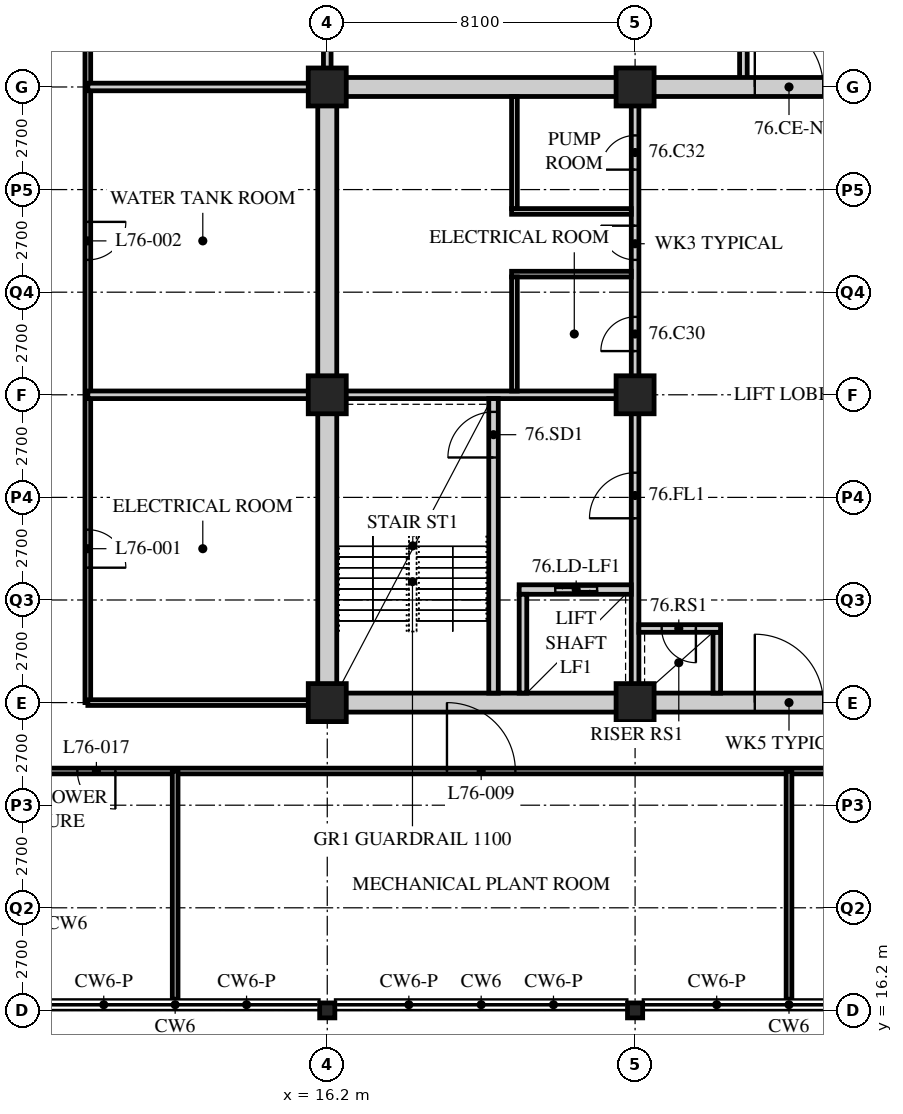
"""IFC4 building model, lengths in metres.
Left out: names, types, materials, properties, quantities, classifications, styles, units other than length and angle.
Written with IfcOpenShell. Run it as: python <this file> out.ifc"""

import sys

from ifc_helpers import new_model, si_unit, direction, frame, frame_2d, origin, origin_2d, place, context, subcontext, project, spatial, rectangle, hollow_rectangle, i_section, extrude, element, fill, save


model = new_model("IFC4")
c1 = context("Model", 3, precision=1e-05, world=origin(), true_north=direction((0.0, 1.0)))
c2 = subcontext(c1, "Body", "Model", "MODEL_VIEW")
j1 = project(units=[si_unit("LENGTHUNIT", "METRE"), si_unit("PLANEANGLEUNIT", "RADIAN")], contexts=[c1])
p1 = place(None, origin())
s1 = spatial("IfcSite", under=j1, at=p1, CompositionType="ELEMENT")
p2 = place(p1, origin())
s2 = spatial("IfcBuilding", under=s1, at=p2, CompositionType="ELEMENT")
p3 = place(p2, frame((0.0, 0.0, 298.5)))
s3 = spatial("IfcBuildingStorey", under=s2, at=p3, CompositionType="ELEMENT", Elevation=298.5)
p4 = place(p3, frame((16.2, 16.2, 0.0), z_axis=(0.0, 0.0, 1.0), x_axis=(1.0, 0.0, 0.0)))
e1 = element("IfcColumn", 1, at=p4, inside=s3, PredefinedType="COLUMN", context=c2, shape_type="SweptSolid", body=[
    extrude(i_section(OverallWidth=0.399, OverallDepth=0.394, WebThickness=0.023, FlangeThickness=0.037, FilletRadius=0.015, at=origin_2d()), origin(), (0.0, 0.0, 1.0), 5.4),
])
for number, where, z_axis, x_axis in (
    (2, (16.2, 24.3, 0.0), (0.0, 0.0, 1.0), (1.0, 0.0, 0.0)),
    (3, (16.2, 32.4, 0.0), (0.0, 0.0, 1.0), (1.0, 0.0, 0.0)),
    (4, (16.2, 40.5, 0.0), (0.0, 0.0, 1.0), (1.0, 0.0, 0.0)),
):
    element("IfcColumn", number, at=place(p3, frame(where, z_axis=z_axis, x_axis=x_axis)), inside=s3, PredefinedType="COLUMN", context=c2, shape_type="SweptSolid", body=[
        extrude(hollow_rectangle(XDim=1.0, YDim=1.0, WallThickness=0.1, at=origin_2d()), origin(), (0.0, 0.0, 1.0), 5.4),
    ])
p5 = place(p3, frame((24.3, 16.2, 0.0), z_axis=(0.0, 0.0, 1.0), x_axis=(1.0, 0.0, 0.0)))
e5 = element("IfcColumn", 5, at=p5, inside=s3, PredefinedType="COLUMN", context=c2, shape_type="SweptSolid", body=[
    extrude(i_section(OverallWidth=0.399, OverallDepth=0.394, WebThickness=0.023, FlangeThickness=0.037, FilletRadius=0.015, at=origin_2d()), origin(), (0.0, 0.0, 1.0), 5.4),
])
for number, where, z_axis, x_axis in (
    (6, (24.3, 24.3, 0.0), (0.0, 0.0, 1.0), (1.0, 0.0, 0.0)),
    (7, (24.3, 32.4, 0.0), (0.0, 0.0, 1.0), (1.0, 0.0, 0.0)),
    (8, (24.3, 40.5, 0.0), (0.0, 0.0, 1.0), (1.0, 0.0, 0.0)),
):
    element("IfcColumn", number, at=place(p3, frame(where, z_axis=z_axis, x_axis=x_axis)), inside=s3, PredefinedType="COLUMN", context=c2, shape_type="SweptSolid", body=[
        extrude(hollow_rectangle(XDim=1.0, YDim=1.0, WallThickness=0.1, at=origin_2d()), origin(), (0.0, 0.0, 1.0), 5.4),
    ])
p6 = place(p3, frame((8.1, 22.5, 0.0), z_axis=(0.0, 0.0, 1.0), x_axis=(1.0, 0.0, 0.0)))
e9 = element("IfcWall", 9, at=p6, inside=s3, PredefinedType="PARTITIONING", context=c2, shape_type="SweptSolid", body=[
    extrude(rectangle(XDim=40.5, YDim=0.15, at=frame_2d((20.25, 0.0))), origin(), (0.0, 0.0, 1.0), 5.19),
])
p7 = place(p6, frame((11.25, 0.0, 0.0)))
e10 = element("IfcOpeningElement", 10, at=p7, cuts=e9, PredefinedType="OPENING", context=c2, shape_type="SweptSolid", body=[
    extrude(rectangle(XDim=1.8, YDim=2.4, at=frame_2d((0.9, 1.2))), frame((0.0, 0.085, 0.0), z_axis=(0.0, -1.0, 0.0), x_axis=(1.0, 0.0, 0.0)), (0.0, 0.0, 1.0), 0.17),
])
p8 = place(p6, frame((27.45, 0.0, 0.0)))
e11 = element("IfcOpeningElement", 11, at=p8, cuts=e9, PredefinedType="OPENING", context=c2, shape_type="SweptSolid", body=[
    extrude(rectangle(XDim=1.8, YDim=2.4, at=frame_2d((0.9, 1.2))), frame((0.0, 0.085, 0.0), z_axis=(0.0, -1.0, 0.0), x_axis=(1.0, 0.0, 0.0)), (0.0, 0.0, 1.0), 0.17),
])
p9 = place(p6, frame((1.525, 0.0, 0.0)))
e12 = element("IfcOpeningElement", 12, at=p9, cuts=e9, PredefinedType="OPENING", context=c2, shape_type="SweptSolid", body=[
    extrude(rectangle(XDim=1.0, YDim=2.1, at=frame_2d((0.5, 1.05))), frame((0.0, 0.085, 0.0), z_axis=(0.0, -1.0, 0.0), x_axis=(1.0, 0.0, 0.0)), (0.0, 0.0, 1.0), 0.17),
])
p10 = place(p6, frame((37.975, 0.0, 0.0)))
e13 = element("IfcOpeningElement", 13, at=p10, cuts=e9, PredefinedType="OPENING", context=c2, shape_type="SweptSolid", body=[
    extrude(rectangle(XDim=1.0, YDim=2.1, at=frame_2d((0.5, 1.05))), frame((0.0, 0.085, 0.0), z_axis=(0.0, -1.0, 0.0), x_axis=(1.0, 0.0, 0.0)), (0.0, 0.0, 1.0), 0.17),
])
p11 = place(p3, frame((9.9, 54.9, 0.0), z_axis=(0.0, 0.0, 1.0), x_axis=(0.0, -1.0, 0.0)))
e14 = element("IfcWall", 14, at=p11, inside=s3, PredefinedType="PARTITIONING", context=c2, shape_type="SweptSolid", body=[
    extrude(rectangle(XDim=30.6, YDim=0.15, at=frame_2d((15.3, 0.0))), origin(), (0.0, 0.0, 1.0), 5.19),
])
p12 = place(p11, frame((26.05, 0.0, 0.0)))
e15 = element("IfcOpeningElement", 15, at=p12, cuts=e14, PredefinedType="OPENING", context=c2, shape_type="SweptSolid", body=[
    extrude(rectangle(XDim=1.0, YDim=2.1, at=frame_2d((0.5, 1.05))), frame((0.0, 0.085, 0.0), z_axis=(0.0, -1.0, 0.0), x_axis=(1.0, 0.0, 0.0)), (0.0, 0.0, 1.0), 0.17),
])
p13 = place(p11, frame((17.95, 0.0, 0.0)))
e16 = element("IfcOpeningElement", 16, at=p13, cuts=e14, PredefinedType="OPENING", context=c2, shape_type="SweptSolid", body=[
    extrude(rectangle(XDim=1.0, YDim=2.1, at=frame_2d((0.5, 1.05))), frame((0.0, 0.085, 0.0), z_axis=(0.0, -1.0, 0.0), x_axis=(1.0, 0.0, 0.0)), (0.0, 0.0, 1.0), 0.17),
])
p14 = place(p3, frame((9.9, 24.3, 0.0), z_axis=(0.0, 0.0, 1.0), x_axis=(1.0, 0.0, 0.0)))
e17 = element("IfcWall", 17, at=p14, inside=s3, PredefinedType="PARTITIONING", context=c2, shape_type="SweptSolid", body=[
    extrude(rectangle(XDim=6.1, YDim=0.15, at=frame_2d((3.05, 0.0))), origin(), (0.0, 0.0, 1.0), 4.428),
])
p15 = place(p3, frame((9.9, 32.4, 0.0), z_axis=(0.0, 0.0, 1.0), x_axis=(1.0, 0.0, 0.0)))
e18 = element("IfcWall", 18, at=p15, inside=s3, PredefinedType="SOLIDWALL", context=c2, shape_type="SweptSolid", body=[
    extrude(rectangle(XDim=6.3, YDim=0.2, at=frame_2d((3.15, 0.0))), origin(), (0.0, 0.0, 1.0), 4.428),
])
p16 = place(p3, frame((16.2, 40.5, 0.0), z_axis=(0.0, 0.0, 1.0), x_axis=(0.0, 1.0, 0.0)))
e19 = element("IfcWall", 19, at=p16, inside=s3, PredefinedType="SOLIDWALL", context=c2, shape_type="SweptSolid", body=[
    extrude(rectangle(XDim=14.4, YDim=0.2, at=frame_2d((7.2, 0.0))), origin(), (0.0, 0.0, 1.0), 4.428),
])
p17 = place(p3, frame((27.15, 40.5, 0.0), z_axis=(0.0, 0.0, 1.0), x_axis=(0.0, 1.0, 0.0)))
e20 = element("IfcWall", 20, at=p17, inside=s3, PredefinedType="SOLIDWALL", context=c2, shape_type="SweptSolid", body=[
    extrude(rectangle(XDim=14.4, YDim=0.2, at=frame_2d((7.2, 0.0))), origin(), (0.0, 0.0, 1.0), 5.19),
])
p18 = place(p3, frame((9.9, 40.5, 0.0), z_axis=(0.0, 0.0, 1.0), x_axis=(1.0, 0.0, 0.0)))
e21 = element("IfcWall", 21, at=p18, inside=s3, PredefinedType="SOLIDWALL", context=c2, shape_type="SweptSolid", body=[
    extrude(rectangle(XDim=6.3, YDim=0.2, at=frame_2d((3.15, 0.0))), origin(), (0.0, 0.0, 1.0), 4.428),
])
for number, where, z_axis, x_axis in (
    (22, (28.35, 22.5, 0.0), (0.0, 0.0, 1.0), (0.0, -1.0, 0.0)),
    (23, (12.198, 22.5, 0.0), (0.0, 0.0, 1.0), (0.0, -1.0, 0.0)),
):
    element("IfcWall", number, at=place(p3, frame(where, z_axis=z_axis, x_axis=x_axis)), inside=s3, PredefinedType="PARTITIONING", context=c2, shape_type="SweptSolid", body=[
        extrude(rectangle(XDim=6.007, YDim=0.15, at=frame_2d((3.003, 0.0))), origin(), (0.0, 0.0, 1.0), 5.19),
    ])
p19 = place(p3, frame((15.95, 24.3, 0.0), z_axis=(0.0, 0.0, 1.0), x_axis=(1.0, 0.0, 0.0)))
e24 = element("IfcWall", 24, at=p19, inside=s3, PredefinedType="SOLIDWALL", context=c2, shape_type="SweptSolid", body=[
    extrude(rectangle(XDim=24.8, YDim=0.5, at=frame_2d((12.4, 0.0))), origin(), (0.0, 0.0, 1.0), 4.428),
])
p20 = place(p19, frame((11.5, 0.0, 0.0)))
e25 = element("IfcOpeningElement", 25, at=p20, cuts=e24, PredefinedType="OPENING", context=c2, shape_type="SweptSolid", body=[
    extrude(rectangle(XDim=1.8, YDim=2.4, at=frame_2d((0.9, 1.2))), frame((0.0, 0.26, 0.0), z_axis=(0.0, -1.0, 0.0), x_axis=(1.0, 0.0, 0.0)), (0.0, 0.0, 1.0), 0.52),
])
p21 = place(p3, frame((15.95, 40.5, 0.0), z_axis=(0.0, 0.0, 1.0), x_axis=(1.0, 0.0, 0.0)))
e26 = element("IfcWall", 26, at=p21, inside=s3, PredefinedType="SOLIDWALL", context=c2, shape_type="SweptSolid", body=[
    extrude(rectangle(XDim=24.8, YDim=0.5, at=frame_2d((12.4, 0.0))), origin(), (0.0, 0.0, 1.0), 4.428),
])
p22 = place(p21, frame((11.5, 0.0, 0.0)))
e27 = element("IfcOpeningElement", 27, at=p22, cuts=e26, PredefinedType="OPENING", context=c2, shape_type="SweptSolid", body=[
    extrude(rectangle(XDim=1.8, YDim=2.4, at=frame_2d((0.9, 1.2))), frame((0.0, 0.26, 0.0), z_axis=(0.0, -1.0, 0.0), x_axis=(1.0, 0.0, 0.0)), (0.0, 0.0, 1.0), 0.52),
])
p23 = place(p3, frame((16.2, 24.55, 0.0), z_axis=(0.0, 0.0, 1.0), x_axis=(0.0, 1.0, 0.0)))
e28 = element("IfcWall", 28, at=p23, inside=s3, PredefinedType="SOLIDWALL", context=c2, shape_type="SweptSolid", body=[
    extrude(rectangle(XDim=15.7, YDim=0.5, at=frame_2d((7.85, 0.0))), origin(), (0.0, 0.0, 1.0), 4.428),
])
p24 = place(p3, frame((16.45, 32.4, 0.0), z_axis=(0.0, 0.0, 1.0), x_axis=(1.0, 0.0, 0.0)))
e29 = element("IfcWall", 29, at=p24, inside=s3, PredefinedType="SOLIDWALL", context=c2, shape_type="SweptSolid", body=[
    extrude(rectangle(XDim=7.95, YDim=0.2, at=frame_2d((3.975, 0.0))), origin(), (0.0, 0.0, 1.0), 4.428),
])
p25 = place(p3, frame((24.3, 24.55, 0.0), z_axis=(0.0, 0.0, 1.0), x_axis=(0.0, 1.0, 0.0)))
e30 = element("IfcWall", 30, at=p25, inside=s3, PredefinedType="SOLIDWALL", context=c2, shape_type="SweptSolid", body=[
    extrude(rectangle(XDim=7.75, YDim=0.2, at=frame_2d((3.875, 0.0))), origin(), (0.0, 0.0, 1.0), 4.428),
])
p26 = place(p25, frame((4.6, 0.0, 0.0)))
e31 = element("IfcOpeningElement", 31, at=p26, cuts=e30, PredefinedType="OPENING", context=c2, shape_type="SweptSolid", body=[
    extrude(rectangle(XDim=1.2, YDim=2.1, at=frame_2d((0.6, 1.05))), frame((0.0, 0.11, 0.0), z_axis=(0.0, -1.0, 0.0), x_axis=(1.0, 0.0, 0.0)), (0.0, 0.0, 1.0), 0.22),
])
p27 = place(p3, frame((20.575, 24.55, 0.0), z_axis=(0.0, 0.0, 1.0), x_axis=(0.0, 1.0, 0.0)))
e32 = element("IfcWall", 32, at=p27, inside=s3, PredefinedType="SOLIDWALL", context=c2, shape_type="SweptSolid", body=[
    extrude(rectangle(XDim=7.75, YDim=0.25, at=frame_2d((3.875, 0.0))), origin(), (0.0, 0.0, 1.0), 5.19),
])
p28 = place(p27, frame((6.2, 0.0, 0.0)))
e33 = element("IfcOpeningElement", 33, at=p28, cuts=e32, PredefinedType="OPENING", context=c2, shape_type="SweptSolid", body=[
    extrude(rectangle(XDim=1.2, YDim=2.1, at=frame_2d((0.6, 1.05))), frame((0.0, 0.135, 0.0), z_axis=(0.0, -1.0, 0.0), x_axis=(1.0, 0.0, 0.0)), (0.0, 0.0, 1.0), 0.27),
])
p29 = place(p3, frame((21.25, 27.275, 0.0), z_axis=(0.0, 0.0, 1.0), x_axis=(1.0, 0.0, 0.0)))
e34 = element("IfcWall", 34, at=p29, inside=s3, PredefinedType="SOLIDWALL", context=c2, shape_type="SweptSolid", body=[
    extrude(rectangle(XDim=2.95, YDim=0.25, at=frame_2d((1.475, 0.0))), origin(), (0.0, 0.0, 1.0), 5.19),
])
p30 = place(p29, frame((0.95, 0.0, 0.0)))
e35 = element("IfcOpeningElement", 35, at=p30, cuts=e34, PredefinedType="OPENING", context=c2, shape_type="SweptSolid", body=[
    extrude(rectangle(XDim=1.1, YDim=2.4, at=frame_2d((0.55, 1.2))), frame((0.0, 0.135, 0.0), z_axis=(0.0, -1.0, 0.0), x_axis=(1.0, 0.0, 0.0)), (0.0, 0.0, 1.0), 0.27),
])
p31 = place(p3, frame((21.35, 24.55, 0.0), z_axis=(0.0, 0.0, 1.0), x_axis=(0.0, 1.0, 0.0)))
e36 = element("IfcWall", 36, at=p31, inside=s3, PredefinedType="SOLIDWALL", context=c2, shape_type="SweptSolid", body=[
    extrude(rectangle(XDim=2.6, YDim=0.2, at=frame_2d((1.3, 0.0))), origin(), (0.0, 0.0, 1.0), 5.19),
])
p32 = place(p3, frame((26.45, 24.55, 0.0), z_axis=(0.0, 0.0, 1.0), x_axis=(0.0, 1.0, 0.0)))
e37 = element("IfcWall", 37, at=p32, inside=s3, PredefinedType="SOLIDWALL", context=c2, shape_type="SweptSolid", body=[
    extrude(rectangle(XDim=1.6, YDim=0.2, at=frame_2d((0.8, 0.0))), origin(), (0.0, 0.0, 1.0), 5.19),
])
p33 = place(p3, frame((24.4, 26.25, 0.0), z_axis=(0.0, 0.0, 1.0), x_axis=(1.0, 0.0, 0.0)))
e38 = element("IfcWall", 38, at=p33, inside=s3, PredefinedType="SOLIDWALL", context=c2, shape_type="SweptSolid", body=[
    extrude(rectangle(XDim=2.15, YDim=0.2, at=frame_2d((1.075, 0.0))), origin(), (0.0, 0.0, 1.0), 5.19),
])
p34 = place(p33, frame((0.6, 0.0, 0.0)))
e39 = element("IfcOpeningElement", 39, at=p34, cuts=e38, PredefinedType="OPENING", context=c2, shape_type="SweptSolid", body=[
    extrude(rectangle(XDim=0.9, YDim=2.1, at=frame_2d((0.45, 1.05))), frame((0.0, 0.11, 0.0), z_axis=(0.0, -1.0, 0.0), x_axis=(1.0, 0.0, 0.0)), (0.0, 0.0, 1.0), 0.22),
])
p35 = place(p3, frame((24.3, 32.5, 0.0), z_axis=(0.0, 0.0, 1.0), x_axis=(0.0, 1.0, 0.0)))
e40 = element("IfcWall", 40, at=p35, inside=s3, PredefinedType="PARTITIONING", context=c2, shape_type="SweptSolid", body=[
    extrude(rectangle(XDim=7.75, YDim=0.2, at=frame_2d((3.875, 0.0))), origin(), (0.0, 0.0, 1.0), 4.428),
])
p36 = place(p35, frame((1.05, 0.0, 0.0)))
e41 = element("IfcOpeningElement", 41, at=p36, cuts=e40, PredefinedType="OPENING", context=c2, shape_type="SweptSolid", body=[
    extrude(rectangle(XDim=0.9, YDim=2.1, at=frame_2d((0.45, 1.05))), frame((0.0, 0.11, 0.0), z_axis=(0.0, -1.0, 0.0), x_axis=(1.0, 0.0, 0.0)), (0.0, 0.0, 1.0), 0.22),
])
p37 = place(p35, frame((3.45, 0.0, 0.0)))
e42 = element("IfcOpeningElement", 42, at=p37, cuts=e40, PredefinedType="OPENING", context=c2, shape_type="SweptSolid", body=[
    extrude(rectangle(XDim=0.9, YDim=2.1, at=frame_2d((0.45, 1.05))), frame((0.0, 0.11, 0.0), z_axis=(0.0, -1.0, 0.0), x_axis=(1.0, 0.0, 0.0)), (0.0, 0.0, 1.0), 0.22),
])
p38 = place(p35, frame((5.825, 0.0, 0.0)))
e43 = element("IfcOpeningElement", 43, at=p38, cuts=e40, PredefinedType="OPENING", context=c2, shape_type="SweptSolid", body=[
    extrude(rectangle(XDim=0.9, YDim=2.1, at=frame_2d((0.45, 1.05))), frame((0.0, 0.11, 0.0), z_axis=(0.0, -1.0, 0.0), x_axis=(1.0, 0.0, 0.0)), (0.0, 0.0, 1.0), 0.22),
])
for number, where, z_axis, x_axis in (
    (44, (21.05, 35.575, 0.0), (0.0, 0.0, 1.0), (1.0, 0.0, 0.0)),
    (45, (21.05, 37.225, 0.0), (0.0, 0.0, 1.0), (1.0, 0.0, 0.0)),
):
    element("IfcWall", number, at=place(p3, frame(where, z_axis=z_axis, x_axis=x_axis)), inside=s3, PredefinedType="PARTITIONING", context=c2, shape_type="SweptSolid", body=[
        extrude(rectangle(XDim=3.15, YDim=0.15, at=frame_2d((1.575, 0.0))), origin(), (0.0, 0.0, 1.0), 5.19),
    ])
p39 = place(p3, frame((21.125, 32.5, 0.0), z_axis=(0.0, 0.0, 1.0), x_axis=(0.0, 1.0, 0.0)))
e46 = element("IfcWall", 46, at=p39, inside=s3, PredefinedType="PARTITIONING", context=c2, shape_type="SweptSolid", body=[
    extrude(rectangle(XDim=3.0, YDim=0.15, at=frame_2d((1.5, 0.0))), origin(), (0.0, 0.0, 1.0), 5.19),
])
p40 = place(p3, frame((21.125, 37.3, 0.0), z_axis=(0.0, 0.0, 1.0), x_axis=(0.0, 1.0, 0.0)))
e47 = element("IfcWall", 47, at=p40, inside=s3, PredefinedType="PARTITIONING", context=c2, shape_type="SweptSolid", body=[
    extrude(rectangle(XDim=2.95, YDim=0.15, at=frame_2d((1.475, 0.0))), origin(), (0.0, 0.0, 1.0), 5.19),
])
p41 = place(p12, origin())
e48 = element("IfcDoor", 48, at=p41, inside=s3, OperationType="SINGLE_SWING_RIGHT", PredefinedType="DOOR", context=c2, shape_type="SweptSolid", body=[
    extrude(rectangle(XDim=1.0, YDim=2.1, at=frame_2d((0.5, 1.05))), frame((0.0, 0.025, 0.0), z_axis=(0.0, -1.0, 0.0), x_axis=(1.0, 0.0, 0.0)), (0.0, 0.0, 1.0), 0.05),
])
fill(e15, e48)
p42 = place(p13, origin())
e49 = element("IfcDoor", 49, at=p42, inside=s3, OperationType="SINGLE_SWING_LEFT", PredefinedType="DOOR", context=c2, shape_type="SweptSolid", body=[
    extrude(rectangle(XDim=1.0, YDim=2.1, at=frame_2d((0.5, 1.05))), frame((0.0, 0.025, 0.0), z_axis=(0.0, -1.0, 0.0), x_axis=(1.0, 0.0, 0.0)), (0.0, 0.0, 1.0), 0.05),
])
fill(e16, e49)
p43 = place(p7, origin())
e50 = element("IfcDoor", 50, at=p43, inside=s3, OperationType="DOUBLE_DOOR_SINGLE_SWING", PredefinedType="DOOR", context=c2, shape_type="SweptSolid", body=[
    extrude(rectangle(XDim=1.8, YDim=2.4, at=frame_2d((0.9, 1.2))), frame((0.0, 0.025, 0.0), z_axis=(0.0, -1.0, 0.0), x_axis=(1.0, 0.0, 0.0)), (0.0, 0.0, 1.0), 0.05),
])
fill(e10, e50)
p44 = place(p9, origin())
e51 = element("IfcDoor", 51, at=p44, inside=s3, OperationType="SINGLE_SWING_LEFT", PredefinedType="DOOR", context=c2, shape_type="SweptSolid", body=[
    extrude(rectangle(XDim=1.0, YDim=2.1, at=frame_2d((0.5, 1.05))), frame((0.0, 0.025, 0.0), z_axis=(0.0, -1.0, 0.0), x_axis=(1.0, 0.0, 0.0)), (0.0, 0.0, 1.0), 0.05),
])
fill(e12, e51)
p45 = place(p36, origin())
e52 = element("IfcDoor", 52, at=p45, inside=s3, OperationType="SINGLE_SWING_LEFT", PredefinedType="DOOR", context=c2, shape_type="SweptSolid", body=[
    extrude(rectangle(XDim=0.9, YDim=2.1, at=frame_2d((0.45, 1.05))), frame((0.0, 0.025, 0.0), z_axis=(0.0, -1.0, 0.0), x_axis=(1.0, 0.0, 0.0)), (0.0, 0.0, 1.0), 0.05),
])
fill(e41, e52)
p46 = place(p37, origin())
e53 = element("IfcDoor", 53, at=p46, inside=s3, OperationType="SINGLE_SWING_RIGHT", PredefinedType="DOOR", context=c2, shape_type="SweptSolid", body=[
    extrude(rectangle(XDim=0.9, YDim=2.1, at=frame_2d((0.45, 1.05))), frame((0.0, 0.025, 0.0), z_axis=(0.0, -1.0, 0.0), x_axis=(1.0, 0.0, 0.0)), (0.0, 0.0, 1.0), 0.05),
])
fill(e42, e53)
p47 = place(p38, origin())
e54 = element("IfcDoor", 54, at=p47, inside=s3, OperationType="SINGLE_SWING_LEFT", PredefinedType="DOOR", context=c2, shape_type="SweptSolid", body=[
    extrude(rectangle(XDim=0.9, YDim=2.1, at=frame_2d((0.45, 1.05))), frame((0.0, 0.025, 0.0), z_axis=(0.0, -1.0, 0.0), x_axis=(1.0, 0.0, 0.0)), (0.0, 0.0, 1.0), 0.05),
])
fill(e43, e54)
p48 = place(p28, origin())
e55 = element("IfcDoor", 55, at=p48, inside=s3, OperationType="SINGLE_SWING_LEFT", PredefinedType="DOOR", context=c2, shape_type="SweptSolid", body=[
    extrude(rectangle(XDim=1.2, YDim=2.1, at=frame_2d((0.6, 1.05))), frame((0.0, 0.025, 0.0), z_axis=(0.0, -1.0, 0.0), x_axis=(1.0, 0.0, 0.0)), (0.0, 0.0, 1.0), 0.05),
])
fill(e33, e55)
p49 = place(p26, origin())
e56 = element("IfcDoor", 56, at=p49, inside=s3, OperationType="SINGLE_SWING_LEFT", PredefinedType="DOOR", context=c2, shape_type="SweptSolid", body=[
    extrude(rectangle(XDim=1.2, YDim=2.1, at=frame_2d((0.6, 1.05))), frame((0.0, 0.025, 0.0), z_axis=(0.0, -1.0, 0.0), x_axis=(1.0, 0.0, 0.0)), (0.0, 0.0, 1.0), 0.05),
])
fill(e31, e56)
p50 = place(p34, origin())
e57 = element("IfcDoor", 57, at=p50, inside=s3, OperationType="SINGLE_SWING_LEFT", PredefinedType="DOOR", context=c2, shape_type="SweptSolid", body=[
    extrude(rectangle(XDim=0.9, YDim=2.1, at=frame_2d((0.45, 1.05))), frame((0.0, 0.025, 0.0), z_axis=(0.0, -1.0, 0.0), x_axis=(1.0, 0.0, 0.0)), (0.0, 0.0, 1.0), 0.05),
])
fill(e39, e57)
p51 = place(p30, origin())
e58 = element("IfcDoor", 58, at=p51, inside=s3, OperationType="DOUBLE_DOOR_SLIDING", PredefinedType="DOOR", context=c2, shape_type="SweptSolid", body=[
    extrude(rectangle(XDim=1.1, YDim=2.4, at=frame_2d((0.55, 1.2))), frame((0.0, 0.025, 0.0), z_axis=(0.0, -1.0, 0.0), x_axis=(1.0, 0.0, 0.0)), (0.0, 0.0, 1.0), 0.05),
])
fill(e35, e58)
p52 = place(p20, origin())
e59 = element("IfcDoor", 59, at=p52, inside=s3, OperationType="DOUBLE_DOOR_SINGLE_SWING", PredefinedType="DOOR", context=c2, shape_type="SweptSolid", body=[
    extrude(rectangle(XDim=1.8, YDim=2.4, at=frame_2d((0.9, 1.2))), frame((0.0, 0.025, 0.0), z_axis=(0.0, -1.0, 0.0), x_axis=(1.0, 0.0, 0.0)), (0.0, 0.0, 1.0), 0.05),
])
fill(e25, e59)
p53 = place(p22, origin())
e60 = element("IfcDoor", 60, at=p53, inside=s3, OperationType="DOUBLE_DOOR_SINGLE_SWING", PredefinedType="DOOR", context=c2, shape_type="SweptSolid", body=[
    extrude(rectangle(XDim=1.8, YDim=2.4, at=frame_2d((0.9, 1.2))), frame((0.0, 0.025, 0.0), z_axis=(0.0, -1.0, 0.0), x_axis=(1.0, 0.0, 0.0)), (0.0, 0.0, 1.0), 0.05),
])
fill(e27, e60)
save(model, sys.argv[1])
